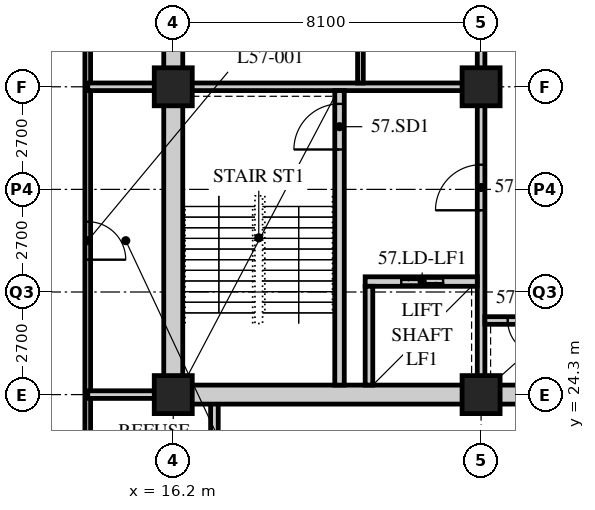
"""IFC4 building model, lengths in metres.
Left out: names, types, materials, properties, quantities, classifications, styles, units other than length and angle.
Written with IfcOpenShell. Run it as: python <this file> out.ifc"""

import sys

from ifc_helpers import new_model, si_unit, direction, frame, frame_2d, origin, origin_2d, place, context, subcontext, project, spatial, rectangle, hollow_rectangle, extrude, element, fill, save


model = new_model("IFC4")
c1 = context("Model", 3, precision=1e-05, world=origin(), true_north=direction((0.0, 1.0)))
c2 = subcontext(c1, "Body", "Model", "MODEL_VIEW")
j1 = project(units=[si_unit("LENGTHUNIT", "METRE"), si_unit("PLANEANGLEUNIT", "RADIAN")], contexts=[c1])
p1 = place(None, origin())
s1 = spatial("IfcSite", under=j1, at=p1, CompositionType="ELEMENT")
p2 = place(p1, origin())
s2 = spatial("IfcBuilding", under=s1, at=p2, CompositionType="ELEMENT")
p3 = place(p2, frame((0.0, 0.0, 220.8)))
s3 = spatial("IfcBuildingStorey", under=s2, at=p3, CompositionType="ELEMENT", Elevation=220.8)
for number, where, z_axis, x_axis in (
    (1, (16.2, 24.3, 0.0), (0.0, 0.0, 1.0), (1.0, 0.0, 0.0)),
    (2, (16.2, 32.4, 0.0), (0.0, 0.0, 1.0), (1.0, 0.0, 0.0)),
    (3, (24.3, 24.3, 0.0), (0.0, 0.0, 1.0), (1.0, 0.0, 0.0)),
    (4, (24.3, 32.4, 0.0), (0.0, 0.0, 1.0), (1.0, 0.0, 0.0)),
):
    element("IfcColumn", number, at=place(p3, frame(where, z_axis=z_axis, x_axis=x_axis)), inside=s3, PredefinedType="COLUMN", context=c2, shape_type="SweptSolid", body=[
        extrude(hollow_rectangle(XDim=1.0, YDim=1.0, WallThickness=0.1, at=origin_2d()), origin(), (0.0, 0.0, 1.0), 3.6),
    ])
p4 = place(p3, frame((13.95, 40.5, 0.0), z_axis=(0.0, 0.0, 1.0), x_axis=(0.0, -1.0, 0.0)))
e5 = element("IfcWall", 5, at=p4, inside=s3, PredefinedType="PARTITIONING", context=c2, shape_type="SweptSolid", body=[
    extrude(rectangle(XDim=19.8, YDim=0.15, at=frame_2d((9.9, 0.0))), origin(), (0.0, 0.0, 1.0), 3.39),
])
p5 = place(p4, frame((11.65, 0.0, 0.0)))
e6 = element("IfcOpeningElement", 6, at=p5, cuts=e5, PredefinedType="OPENING", context=c2, shape_type="SweptSolid", body=[
    extrude(rectangle(XDim=1.0, YDim=2.1, at=frame_2d((0.5, 1.05))), frame((0.0, 0.085, 0.0), z_axis=(0.0, -1.0, 0.0), x_axis=(1.0, 0.0, 0.0)), (0.0, 0.0, 1.0), 0.17),
])
p6 = place(p4, frame((3.55, 0.0, 0.0)))
e7 = element("IfcOpeningElement", 7, at=p6, cuts=e5, PredefinedType="OPENING", context=c2, shape_type="SweptSolid", body=[
    extrude(rectangle(XDim=1.0, YDim=2.1, at=frame_2d((0.5, 1.05))), frame((0.0, 0.085, 0.0), z_axis=(0.0, -1.0, 0.0), x_axis=(1.0, 0.0, 0.0)), (0.0, 0.0, 1.0), 0.17),
])
p7 = place(p3, frame((13.95, 32.4, 0.0), z_axis=(0.0, 0.0, 1.0), x_axis=(1.0, 0.0, 0.0)))
e8 = element("IfcWall", 8, at=p7, inside=s3, PredefinedType="SOLIDWALL", context=c2, shape_type="SweptSolid", body=[
    extrude(rectangle(XDim=2.25, YDim=0.2, at=frame_2d((1.125, 0.0))), origin(), (0.0, 0.0, 1.0), 3.39),
])
p8 = place(p3, frame((17.283, 20.7, 0.0), z_axis=(0.0, 0.0, 1.0), x_axis=(0.0, 1.0, 0.0)))
e9 = element("IfcWall", 9, at=p8, inside=s3, PredefinedType="SOLIDWALL", context=c2, shape_type="SweptSolid", body=[
    extrude(rectangle(XDim=3.6, YDim=0.2, at=frame_2d((1.8, 0.0))), origin(), (0.0, 0.0, 1.0), 3.39),
])
p9 = place(p3, frame((13.95, 24.3, 0.0), z_axis=(0.0, 0.0, 1.0), x_axis=(1.0, 0.0, 0.0)))
e10 = element("IfcWall", 10, at=p9, inside=s3, PredefinedType="SOLIDWALL", context=c2, shape_type="SweptSolid", body=[
    extrude(rectangle(XDim=2.25, YDim=0.2, at=frame_2d((1.125, 0.0))), origin(), (0.0, 0.0, 1.0), 3.39),
])
p10 = place(p3, frame((15.95, 24.3, 0.0), z_axis=(0.0, 0.0, 1.0), x_axis=(1.0, 0.0, 0.0)))
e11 = element("IfcWall", 11, at=p10, inside=s3, PredefinedType="SOLIDWALL", context=c2, shape_type="SweptSolid", body=[
    extrude(rectangle(XDim=24.8, YDim=0.5, at=frame_2d((12.4, 0.0))), origin(), (0.0, 0.0, 1.0), 2.628),
])
p11 = place(p10, frame((11.5, 0.0, 0.0)))
e12 = element("IfcOpeningElement", 12, at=p11, cuts=e11, PredefinedType="OPENING", context=c2, shape_type="SweptSolid", body=[
    extrude(rectangle(XDim=1.8, YDim=2.4, at=frame_2d((0.9, 1.2))), frame((0.0, 0.26, 0.0), z_axis=(0.0, -1.0, 0.0), x_axis=(1.0, 0.0, 0.0)), (0.0, 0.0, 1.0), 0.52),
])
p12 = place(p3, frame((16.2, 24.55, 0.0), z_axis=(0.0, 0.0, 1.0), x_axis=(0.0, 1.0, 0.0)))
e13 = element("IfcWall", 13, at=p12, inside=s3, PredefinedType="SOLIDWALL", context=c2, shape_type="SweptSolid", body=[
    extrude(rectangle(XDim=15.7, YDim=0.5, at=frame_2d((7.85, 0.0))), origin(), (0.0, 0.0, 1.0), 2.628),
])
p13 = place(p3, frame((16.45, 32.4, 0.0), z_axis=(0.0, 0.0, 1.0), x_axis=(1.0, 0.0, 0.0)))
e14 = element("IfcWall", 14, at=p13, inside=s3, PredefinedType="SOLIDWALL", context=c2, shape_type="SweptSolid", body=[
    extrude(rectangle(XDim=7.95, YDim=0.2, at=frame_2d((3.975, 0.0))), origin(), (0.0, 0.0, 1.0), 2.778),
])
p14 = place(p3, frame((24.3, 24.55, 0.0), z_axis=(0.0, 0.0, 1.0), x_axis=(0.0, 1.0, 0.0)))
e15 = element("IfcWall", 15, at=p14, inside=s3, PredefinedType="SOLIDWALL", context=c2, shape_type="SweptSolid", body=[
    extrude(rectangle(XDim=7.75, YDim=0.2, at=frame_2d((3.875, 0.0))), origin(), (0.0, 0.0, 1.0), 2.778),
])
p15 = place(p14, frame((4.6, 0.0, 0.0)))
e16 = element("IfcOpeningElement", 16, at=p15, cuts=e15, PredefinedType="OPENING", context=c2, shape_type="SweptSolid", body=[
    extrude(rectangle(XDim=1.2, YDim=2.1, at=frame_2d((0.6, 1.05))), frame((0.0, 0.11, 0.0), z_axis=(0.0, -1.0, 0.0), x_axis=(1.0, 0.0, 0.0)), (0.0, 0.0, 1.0), 0.22),
])
p16 = place(p3, frame((20.575, 24.55, 0.0), z_axis=(0.0, 0.0, 1.0), x_axis=(0.0, 1.0, 0.0)))
e17 = element("IfcWall", 17, at=p16, inside=s3, PredefinedType="SOLIDWALL", context=c2, shape_type="SweptSolid", body=[
    extrude(rectangle(XDim=7.75, YDim=0.25, at=frame_2d((3.875, 0.0))), origin(), (0.0, 0.0, 1.0), 3.39),
])
p17 = place(p16, frame((6.2, 0.0, 0.0)))
e18 = element("IfcOpeningElement", 18, at=p17, cuts=e17, PredefinedType="OPENING", context=c2, shape_type="SweptSolid", body=[
    extrude(rectangle(XDim=1.2, YDim=2.1, at=frame_2d((0.6, 1.05))), frame((0.0, 0.135, 0.0), z_axis=(0.0, -1.0, 0.0), x_axis=(1.0, 0.0, 0.0)), (0.0, 0.0, 1.0), 0.27),
])
p18 = place(p3, frame((21.25, 27.275, 0.0), z_axis=(0.0, 0.0, 1.0), x_axis=(1.0, 0.0, 0.0)))
e19 = element("IfcWall", 19, at=p18, inside=s3, PredefinedType="SOLIDWALL", context=c2, shape_type="SweptSolid", body=[
    extrude(rectangle(XDim=2.95, YDim=0.25, at=frame_2d((1.475, 0.0))), origin(), (0.0, 0.0, 1.0), 3.39),
])
p19 = place(p18, frame((0.95, 0.0, 0.0)))
e20 = element("IfcOpeningElement", 20, at=p19, cuts=e19, PredefinedType="OPENING", context=c2, shape_type="SweptSolid", body=[
    extrude(rectangle(XDim=1.1, YDim=2.4, at=frame_2d((0.55, 1.2))), frame((0.0, 0.135, 0.0), z_axis=(0.0, -1.0, 0.0), x_axis=(1.0, 0.0, 0.0)), (0.0, 0.0, 1.0), 0.27),
])
p20 = place(p3, frame((21.35, 24.55, 0.0), z_axis=(0.0, 0.0, 1.0), x_axis=(0.0, 1.0, 0.0)))
e21 = element("IfcWall", 21, at=p20, inside=s3, PredefinedType="SOLIDWALL", context=c2, shape_type="SweptSolid", body=[
    extrude(rectangle(XDim=2.6, YDim=0.2, at=frame_2d((1.3, 0.0))), origin(), (0.0, 0.0, 1.0), 3.39),
])
p21 = place(p3, frame((24.4, 26.25, 0.0), z_axis=(0.0, 0.0, 1.0), x_axis=(1.0, 0.0, 0.0)))
e22 = element("IfcWall", 22, at=p21, inside=s3, PredefinedType="SOLIDWALL", context=c2, shape_type="SweptSolid", body=[
    extrude(rectangle(XDim=2.15, YDim=0.2, at=frame_2d((1.075, 0.0))), origin(), (0.0, 0.0, 1.0), 3.39),
])
p22 = place(p21, frame((0.6, 0.0, 0.0)))
e23 = element("IfcOpeningElement", 23, at=p22, cuts=e22, PredefinedType="OPENING", context=c2, shape_type="SweptSolid", body=[
    extrude(rectangle(XDim=0.9, YDim=2.1, at=frame_2d((0.45, 1.05))), frame((0.0, 0.11, 0.0), z_axis=(0.0, -1.0, 0.0), x_axis=(1.0, 0.0, 0.0)), (0.0, 0.0, 1.0), 0.22),
])
p23 = place(p3, frame((24.3, 32.5, 0.0), z_axis=(0.0, 0.0, 1.0), x_axis=(0.0, 1.0, 0.0)))
e24 = element("IfcWall", 24, at=p23, inside=s3, PredefinedType="PARTITIONING", context=c2, shape_type="SweptSolid", body=[
    extrude(rectangle(XDim=7.75, YDim=0.2, at=frame_2d((3.875, 0.0))), origin(), (0.0, 0.0, 1.0), 2.778),
])
p24 = place(p23, frame((1.275, 0.0, 0.0)))
e25 = element("IfcOpeningElement", 25, at=p24, cuts=e24, PredefinedType="OPENING", context=c2, shape_type="SweptSolid", body=[
    extrude(rectangle(XDim=1.0, YDim=2.1, at=frame_2d((0.5, 1.05))), frame((0.0, 0.11, 0.0), z_axis=(0.0, -1.0, 0.0), x_axis=(1.0, 0.0, 0.0)), (0.0, 0.0, 1.0), 0.22),
])
p25 = place(p23, frame((4.0, 0.0, 0.0)))
e26 = element("IfcOpeningElement", 26, at=p25, cuts=e24, PredefinedType="OPENING", context=c2, shape_type="SweptSolid", body=[
    extrude(rectangle(XDim=0.9, YDim=2.1, at=frame_2d((0.45, 1.05))), frame((0.0, 0.11, 0.0), z_axis=(0.0, -1.0, 0.0), x_axis=(1.0, 0.0, 0.0)), (0.0, 0.0, 1.0), 0.22),
])
p26 = place(p23, frame((6.1, 0.0, 0.0)))
e27 = element("IfcOpeningElement", 27, at=p26, cuts=e24, PredefinedType="OPENING", context=c2, shape_type="SweptSolid", body=[
    extrude(rectangle(XDim=0.9, YDim=2.1, at=frame_2d((0.45, 1.05))), frame((0.0, 0.11, 0.0), z_axis=(0.0, -1.0, 0.0), x_axis=(1.0, 0.0, 0.0)), (0.0, 0.0, 1.0), 0.22),
])
p27 = place(p3, frame((21.125, 32.5, 0.0), z_axis=(0.0, 0.0, 1.0), x_axis=(0.0, 1.0, 0.0)))
e28 = element("IfcWall", 28, at=p27, inside=s3, PredefinedType="PARTITIONING", context=c2, shape_type="SweptSolid", body=[
    extrude(rectangle(XDim=3.55, YDim=0.15, at=frame_2d((1.775, 0.0))), origin(), (0.0, 0.0, 1.0), 3.39),
])
p28 = place(p5, origin())
e29 = element("IfcDoor", 29, at=p28, inside=s3, OperationType="SINGLE_SWING_RIGHT", PredefinedType="DOOR", context=c2, shape_type="SweptSolid", body=[
    extrude(rectangle(XDim=1.0, YDim=2.1, at=frame_2d((0.5, 1.05))), frame((0.0, 0.025, 0.0), z_axis=(0.0, -1.0, 0.0), x_axis=(1.0, 0.0, 0.0)), (0.0, 0.0, 1.0), 0.05),
])
fill(e6, e29)
p29 = place(p17, origin())
e30 = element("IfcDoor", 30, at=p29, inside=s3, OperationType="SINGLE_SWING_LEFT", PredefinedType="DOOR", context=c2, shape_type="SweptSolid", body=[
    extrude(rectangle(XDim=1.2, YDim=2.1, at=frame_2d((0.6, 1.05))), frame((0.0, 0.025, 0.0), z_axis=(0.0, -1.0, 0.0), x_axis=(1.0, 0.0, 0.0)), (0.0, 0.0, 1.0), 0.05),
])
fill(e18, e30)
p30 = place(p15, origin())
e31 = element("IfcDoor", 31, at=p30, inside=s3, OperationType="SINGLE_SWING_LEFT", PredefinedType="DOOR", context=c2, shape_type="SweptSolid", body=[
    extrude(rectangle(XDim=1.2, YDim=2.1, at=frame_2d((0.6, 1.05))), frame((0.0, 0.025, 0.0), z_axis=(0.0, -1.0, 0.0), x_axis=(1.0, 0.0, 0.0)), (0.0, 0.0, 1.0), 0.05),
])
fill(e16, e31)
p31 = place(p22, origin())
e32 = element("IfcDoor", 32, at=p31, inside=s3, OperationType="SINGLE_SWING_LEFT", PredefinedType="DOOR", context=c2, shape_type="SweptSolid", body=[
    extrude(rectangle(XDim=0.9, YDim=2.1, at=frame_2d((0.45, 1.05))), frame((0.0, 0.025, 0.0), z_axis=(0.0, -1.0, 0.0), x_axis=(1.0, 0.0, 0.0)), (0.0, 0.0, 1.0), 0.05),
])
fill(e23, e32)
p32 = place(p19, origin())
e33 = element("IfcDoor", 33, at=p32, inside=s3, OperationType="DOUBLE_DOOR_SLIDING", PredefinedType="DOOR", context=c2, shape_type="SweptSolid", body=[
    extrude(rectangle(XDim=1.1, YDim=2.4, at=frame_2d((0.55, 1.2))), frame((0.0, 0.025, 0.0), z_axis=(0.0, -1.0, 0.0), x_axis=(1.0, 0.0, 0.0)), (0.0, 0.0, 1.0), 0.05),
])
fill(e20, e33)
save(model, sys.argv[1])
